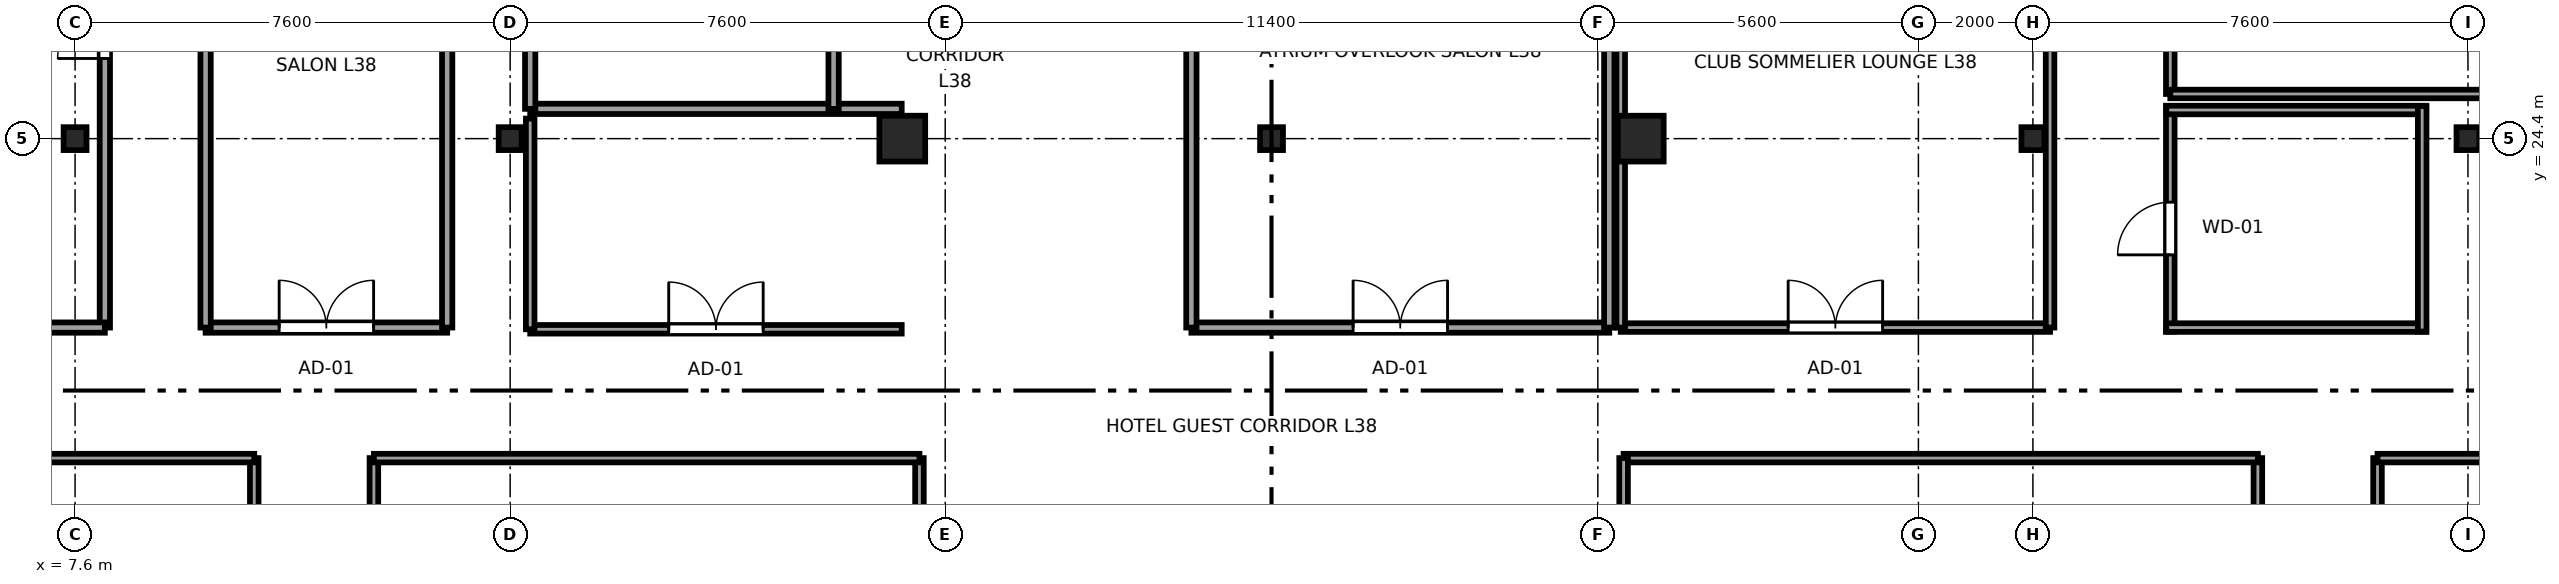
"""IFC4 building model, lengths in metres.
Left out: names, types, materials, properties, quantities, classifications, styles, units other than length and angle.
Written with IfcOpenShell. Run it as: python <this file> out.ifc"""

import sys

from ifc_helpers import new_model, si_unit, direction, frame, frame_2d, origin, origin_2d, place, context, subcontext, project, spatial, rectangle, i_section, extrude, source, transform, mapped, element, fill, save


model = new_model("IFC4")
c1 = context("Model", 3, precision=1e-05, world=origin(), true_north=direction((0.0, 1.0)))
c2 = subcontext(c1, "Body", "Model", "MODEL_VIEW")
j1 = project(units=[si_unit("LENGTHUNIT", "METRE"), si_unit("PLANEANGLEUNIT", "RADIAN")], contexts=[c1])
p1 = place(None, origin())
s1 = spatial("IfcSite", under=j1, at=p1, CompositionType="ELEMENT")
p2 = place(p1, origin())
s2 = spatial("IfcBuilding", under=s1, at=p2, CompositionType="ELEMENT")
p3 = place(p2, frame((0.0, 0.0, 147.05)))
s3 = spatial("IfcBuildingStorey", under=s2, at=p3, CompositionType="ELEMENT", Elevation=147.05)
m1 = source(origin(), c2, "Body", "SweptSolid", [
    extrude(i_section(OverallWidth=0.4, OverallDepth=0.4, WebThickness=0.02, FlangeThickness=0.035, at=origin_2d()), origin(), (0.0, 0.0, 1.0), 3.55),
])
for number, where, z_axis, x_axis in (
    (1, (7.6, 24.4, 0.0), (0.0, 0.0, 1.0), (1.0, 0.0, 0.0)),
    (2, (15.2, 24.4, 0.0), (0.0, 0.0, 1.0), (1.0, 0.0, 0.0)),
):
    element("IfcColumn", number, at=place(p3, frame(where, z_axis=z_axis, x_axis=x_axis)), inside=s3, PredefinedType="COLUMN", context=c2, shape_type="MappedRepresentation", body=[
        mapped(m1, transform((0.0, 0.0, 0.0), x_axis=(1.0, 0.0, 0.0), y_axis=(0.0, 1.0, 0.0), z_axis=(0.0, 0.0, 1.0), scale=1.0)),
    ])
m2 = source(origin(), c2, "Body", "SweptSolid", [
    extrude(rectangle(XDim=0.8, YDim=0.8, at=origin_2d()), origin(), (0.0, 0.0, 1.0), 3.55),
])
for number, where, z_axis, x_axis in (
    (3, (22.05, 24.4, 0.0), (0.0, 0.0, 1.0), (1.0, 0.0, 0.0)),
    (4, (34.95, 24.4, 0.0), (0.0, 0.0, 1.0), (1.0, 0.0, 0.0)),
):
    element("IfcColumn", number, at=place(p3, frame(where, z_axis=z_axis, x_axis=x_axis)), inside=s3, PredefinedType="COLUMN", context=c2, shape_type="MappedRepresentation", body=[
        mapped(m2, transform((0.0, 0.0, 0.0), x_axis=(1.0, 0.0, 0.0), y_axis=(0.0, 1.0, 0.0), z_axis=(0.0, 0.0, 1.0), scale=1.0)),
    ])
for number, where, z_axis, x_axis in (
    (5, (41.8, 24.4, 0.0), (0.0, 0.0, 1.0), (1.0, 0.0, 0.0)),
    (6, (49.4, 24.4, 0.0), (0.0, 0.0, 1.0), (1.0, 0.0, 0.0)),
    (7, (28.5, 24.4, 0.0), (0.0, 0.0, 1.0), (1.0, 0.0, 0.0)),
):
    element("IfcColumn", number, at=place(p3, frame(where, z_axis=z_axis, x_axis=x_axis)), inside=s3, PredefinedType="COLUMN", context=c2, shape_type="MappedRepresentation", body=[
        mapped(m1, transform((0.0, 0.0, 0.0), x_axis=(1.0, 0.0, 0.0), y_axis=(0.0, 1.0, 0.0), z_axis=(0.0, 0.0, 1.0), scale=1.0)),
    ])
p4 = place(p3, frame((10.73, 13.41, 0.0), z_axis=(0.0, 0.0, 1.0), x_axis=(0.0, 1.0, 0.0)))
e8 = element("IfcWall", 8, at=p4, inside=s3, PredefinedType="PARTITIONING", context=c2, shape_type="SweptSolid", body=[
    extrude(rectangle(XDim=5.41, YDim=0.15, at=frame_2d((2.705, 0.0))), origin(), (0.0, 0.0, 1.0), 3.37),
])
p5 = place(p4, frame((2.195, 0.0, 0.0)))
e9 = element("IfcOpeningElement", 9, at=p5, cuts=e8, PredefinedType="OPENING", context=c2, shape_type="SweptSolid", body=[
    extrude(rectangle(XDim=0.98, YDim=2.12, at=frame_2d((0.49, 1.06))), frame((0.0, 0.085, 0.0), z_axis=(0.0, -1.0, 0.0), x_axis=(1.0, 0.0, 0.0)), (0.0, 0.0, 1.0), 0.17),
])
p6 = place(p3, frame((3.005, 18.82, 0.0), z_axis=(0.0, 0.0, 1.0), x_axis=(1.0, 0.0, 0.0)))
e10 = element("IfcWall", 10, at=p6, inside=s3, PredefinedType="PARTITIONING", context=c2, shape_type="SweptSolid", body=[
    extrude(rectangle(XDim=7.725, YDim=0.15, at=frame_2d((3.863, 0.0))), origin(), (0.0, 0.0, 1.0), 3.37),
])
p7 = place(p3, frame((12.82, 15.713, 0.0), z_axis=(0.0, 0.0, 1.0), x_axis=(0.0, 1.0, 0.0)))
e11 = element("IfcWall", 11, at=p7, inside=s3, PredefinedType="PARTITIONING", context=c2, shape_type="SweptSolid", body=[
    extrude(rectangle(XDim=3.107, YDim=0.15, at=frame_2d((1.554, 0.0))), origin(), (0.0, 0.0, 1.0), 3.37),
])
p8 = place(p7, frame((1.043, 0.0, 0.0)))
e12 = element("IfcOpeningElement", 12, at=p8, cuts=e11, PredefinedType="OPENING", context=c2, shape_type="SweptSolid", body=[
    extrude(rectangle(XDim=0.98, YDim=2.12, at=frame_2d((0.49, 1.06))), frame((0.0, 0.085, 0.0), z_axis=(0.0, -1.0, 0.0), x_axis=(1.0, 0.0, 0.0)), (0.0, 0.0, 1.0), 0.17),
])
p9 = place(p3, frame((22.35, 13.68, 0.0), z_axis=(0.0, 0.0, 1.0), x_axis=(0.0, 1.0, 0.0)))
e13 = element("IfcWall", 13, at=p9, inside=s3, PredefinedType="PARTITIONING", context=c2, shape_type="SweptSolid", body=[
    extrude(rectangle(XDim=5.14, YDim=0.15, at=frame_2d((2.57, 0.0))), origin(), (0.0, 0.0, 1.0), 2.16),
])
p10 = place(p3, frame((12.82, 18.82, 0.0), z_axis=(0.0, 0.0, 1.0), x_axis=(1.0, 0.0, 0.0)))
e14 = element("IfcWall", 14, at=p10, inside=s3, PredefinedType="PARTITIONING", context=c2, shape_type="SweptSolid", body=[
    extrude(rectangle(XDim=9.53, YDim=0.15, at=frame_2d((4.765, 0.0))), origin(), (0.0, 0.0, 1.0), 3.37),
])
p11 = place(p3, frame((45.73, 13.41, 0.0), z_axis=(0.0, 0.0, 1.0), x_axis=(0.0, 1.0, 0.0)))
e15 = element("IfcWall", 15, at=p11, inside=s3, PredefinedType="PARTITIONING", context=c2, shape_type="SweptSolid", body=[
    extrude(rectangle(XDim=5.41, YDim=0.15, at=frame_2d((2.705, 0.0))), origin(), (0.0, 0.0, 1.0), 3.001),
])
p12 = place(p11, frame((2.195, 0.0, 0.0)))
e16 = element("IfcOpeningElement", 16, at=p12, cuts=e15, PredefinedType="OPENING", context=c2, shape_type="SweptSolid", body=[
    extrude(rectangle(XDim=0.98, YDim=2.12, at=frame_2d((0.49, 1.06))), frame((0.0, 0.085, 0.0), z_axis=(0.0, -1.0, 0.0), x_axis=(1.0, 0.0, 0.0)), (0.0, 0.0, 1.0), 0.17),
])
p13 = place(p3, frame((34.65, 18.82, 0.0), z_axis=(0.0, 0.0, 1.0), x_axis=(1.0, 0.0, 0.0)))
e17 = element("IfcWall", 17, at=p13, inside=s3, PredefinedType="PARTITIONING", context=c2, shape_type="SweptSolid", body=[
    extrude(rectangle(XDim=11.08, YDim=0.15, at=frame_2d((5.54, 0.0))), origin(), (0.0, 0.0, 1.0), 3.37),
])
p14 = place(p3, frame((34.65, 11.08, 0.0), z_axis=(0.0, 0.0, 1.0), x_axis=(0.0, 1.0, 0.0)))
e18 = element("IfcWall", 18, at=p14, inside=s3, PredefinedType="PARTITIONING", context=c2, shape_type="SweptSolid", body=[
    extrude(rectangle(XDim=7.74, YDim=0.15, at=frame_2d((3.87, 0.0))), origin(), (0.0, 0.0, 1.0), 2.16),
])
p15 = place(p3, frame((47.82, 15.713, 0.0), z_axis=(0.0, 0.0, 1.0), x_axis=(0.0, 1.0, 0.0)))
e19 = element("IfcWall", 19, at=p15, inside=s3, PredefinedType="PARTITIONING", context=c2, shape_type="SweptSolid", body=[
    extrude(rectangle(XDim=3.107, YDim=0.15, at=frame_2d((1.554, 0.0))), origin(), (0.0, 0.0, 1.0), 3.37),
])
p16 = place(p15, frame((1.043, 0.0, 0.0)))
e20 = element("IfcOpeningElement", 20, at=p16, cuts=e19, PredefinedType="OPENING", context=c2, shape_type="SweptSolid", body=[
    extrude(rectangle(XDim=0.98, YDim=2.12, at=frame_2d((0.49, 1.06))), frame((0.0, 0.085, 0.0), z_axis=(0.0, -1.0, 0.0), x_axis=(1.0, 0.0, 0.0)), (0.0, 0.0, 1.0), 0.17),
])
p17 = place(p3, frame((47.82, 18.82, 0.0), z_axis=(0.0, 0.0, 1.0), x_axis=(1.0, 0.0, 0.0)))
e21 = element("IfcWall", 21, at=p17, inside=s3, PredefinedType="PARTITIONING", context=c2, shape_type="SweptSolid", body=[
    extrude(rectangle(XDim=6.175, YDim=0.15, at=frame_2d((3.087, 0.0))), origin(), (0.0, 0.0, 1.0), 3.37),
])
p18 = place(p3, frame((8.12, 21.1, 0.0), z_axis=(0.0, 0.0, 1.0), x_axis=(0.0, 1.0, 0.0)))
e22 = element("IfcWall", 22, at=p18, inside=s3, PredefinedType="PARTITIONING", context=c2, shape_type="SweptSolid", body=[
    extrude(rectangle(XDim=14.7, YDim=0.18, at=frame_2d((7.35, 0.0))), origin(), (0.0, 0.0, 1.0), 3.37),
])
p19 = place(p18, frame((4.7, 0.0, 0.0)))
e23 = element("IfcOpeningElement", 23, at=p19, cuts=e22, PredefinedType="OPENING", context=c2, shape_type="SweptSolid", body=[
    extrude(rectangle(XDim=1.65, YDim=2.15, at=frame_2d((0.825, 1.075))), frame((0.0, 0.1, 0.0), z_axis=(0.0, -1.0, 0.0), x_axis=(1.0, 0.0, 0.0)), (0.0, 0.0, 1.0), 0.2),
])
p20 = place(p3, frame((3.005, 21.1, 0.0), z_axis=(0.0, 0.0, 1.0), x_axis=(1.0, 0.0, 0.0)))
e24 = element("IfcWall", 24, at=p20, inside=s3, PredefinedType="PARTITIONING", context=c2, shape_type="SweptSolid", body=[
    extrude(rectangle(XDim=5.115, YDim=0.18, at=frame_2d((2.558, 0.0))), origin(), (0.0, 0.0, 1.0), 3.37),
])
p21 = place(p3, frame((44.2, 21.03, 0.0), z_axis=(0.0, 0.0, 1.0), x_axis=(0.0, 1.0, 0.0)))
e25 = element("IfcWall", 25, at=p21, inside=s3, PredefinedType="PARTITIONING", context=c2, shape_type="SweptSolid", body=[
    extrude(rectangle(XDim=3.94, YDim=0.15, at=frame_2d((1.97, 0.0))), origin(), (0.0, 0.0, 1.0), 3.37),
])
p22 = place(p21, frame((1.34, 0.0, 0.0)))
e26 = element("IfcOpeningElement", 26, at=p22, cuts=e25, PredefinedType="OPENING", context=c2, shape_type="SweptSolid", body=[
    extrude(rectangle(XDim=0.92, YDim=2.01, at=frame_2d((0.46, 1.005))), frame((0.0, 0.085, 0.0), z_axis=(0.0, -1.0, 0.0), x_axis=(1.0, 0.0, 0.0)), (0.0, 0.0, 1.0), 0.17),
])
for number, where, z_axis, x_axis in (
    (27, (44.13, 21.1, 0.0), (0.0, 0.0, 1.0), (1.0, 0.0, 0.0)),
    (28, (44.13, 24.9, 0.0), (0.0, 0.0, 1.0), (1.0, 0.0, 0.0)),
):
    element("IfcWall", number, at=place(p3, frame(where, z_axis=z_axis, x_axis=x_axis)), inside=s3, PredefinedType="PARTITIONING", context=c2, shape_type="SweptSolid", body=[
        extrude(rectangle(XDim=4.54, YDim=0.15, at=frame_2d((2.27, 0.0))), origin(), (0.0, 0.0, 1.0), 3.37),
    ])
p23 = place(p3, frame((48.6, 21.03, 0.0), z_axis=(0.0, 0.0, 1.0), x_axis=(0.0, 1.0, 0.0)))
e29 = element("IfcWall", 29, at=p23, inside=s3, PredefinedType="PARTITIONING", context=c2, shape_type="SweptSolid", body=[
    extrude(rectangle(XDim=3.94, YDim=0.15, at=frame_2d((1.97, 0.0))), origin(), (0.0, 0.0, 1.0), 3.37),
])
p24 = place(p3, frame((44.2, 25.18, 0.0), z_axis=(0.0, 0.0, 1.0), x_axis=(0.0, 1.0, 0.0)))
e30 = element("IfcWall", 30, at=p24, inside=s3, PredefinedType="PARTITIONING", context=c2, shape_type="SweptSolid", body=[
    extrude(rectangle(XDim=12.34, YDim=0.15, at=frame_2d((6.17, 0.0))), origin(), (0.0, 0.0, 1.0), 3.37),
])
p25 = place(p24, frame((5.68, 0.0, 0.0)))
e31 = element("IfcOpeningElement", 31, at=p25, cuts=e30, PredefinedType="OPENING", context=c2, shape_type="SweptSolid", body=[
    extrude(rectangle(XDim=0.98, YDim=2.12, at=frame_2d((0.49, 1.06))), frame((0.0, 0.085, 0.0), z_axis=(0.0, -1.0, 0.0), x_axis=(1.0, 0.0, 0.0)), (0.0, 0.0, 1.0), 0.17),
])
p26 = place(p3, frame((44.2, 25.18, 0.0), z_axis=(0.0, 0.0, 1.0), x_axis=(1.0, 0.0, 0.0)))
e32 = element("IfcWall", 32, at=p26, inside=s3, PredefinedType="PARTITIONING", context=c2, shape_type="SweptSolid", body=[
    extrude(rectangle(XDim=9.795, YDim=0.15, at=frame_2d((4.897, 0.0))), origin(), (0.0, 0.0, 1.0), 3.37),
])
p27 = place(p3, frame((9.88, 21.1, 0.0), z_axis=(0.0, 0.0, 1.0), x_axis=(1.0, 0.0, 0.0)))
e33 = element("IfcWall", 33, at=p27, inside=s3, PredefinedType="PARTITIONING", context=c2, shape_type="SweptSolid", body=[
    extrude(rectangle(XDim=4.22, YDim=0.18, at=frame_2d((2.11, 0.0))), origin(), (0.0, 0.0, 1.0), 3.37),
])
p28 = place(p27, frame((1.285, 0.0, 0.0)))
e34 = element("IfcOpeningElement", 34, at=p28, cuts=e33, PredefinedType="OPENING", context=c2, shape_type="SweptSolid", body=[
    extrude(rectangle(XDim=1.65, YDim=2.15, at=frame_2d((0.825, 1.075))), frame((0.0, 0.1, 0.0), z_axis=(0.0, -1.0, 0.0), x_axis=(1.0, 0.0, 0.0)), (0.0, 0.0, 1.0), 0.2),
])
for number, where, z_axis, x_axis in (
    (35, (9.88, 21.1, 0.0), (0.0, 0.0, 1.0), (0.0, 1.0, 0.0)),
    (36, (14.1, 21.1, 0.0), (0.0, 0.0, 1.0), (0.0, 1.0, 0.0)),
):
    element("IfcWall", number, at=place(p3, frame(where, z_axis=z_axis, x_axis=x_axis)), inside=s3, PredefinedType="PARTITIONING", context=c2, shape_type="SweptSolid", body=[
        extrude(rectangle(XDim=8.65, YDim=0.18, at=frame_2d((4.325, 0.0))), origin(), (0.0, 0.0, 1.0), 3.37),
    ])
p29 = place(p3, frame((27.1, 21.1, 0.0), z_axis=(0.0, 0.0, 1.0), x_axis=(1.0, 0.0, 0.0)))
e37 = element("IfcWall", 37, at=p29, inside=s3, PredefinedType="PARTITIONING", context=c2, shape_type="SweptSolid", body=[
    extrude(rectangle(XDim=7.3, YDim=0.18, at=frame_2d((3.65, 0.0))), origin(), (0.0, 0.0, 1.0), 3.37),
])
p30 = place(p29, frame((2.825, 0.0, 0.0)))
e38 = element("IfcOpeningElement", 38, at=p30, cuts=e37, PredefinedType="OPENING", context=c2, shape_type="SweptSolid", body=[
    extrude(rectangle(XDim=1.65, YDim=2.15, at=frame_2d((0.825, 1.075))), frame((0.0, 0.1, 0.0), z_axis=(0.0, -1.0, 0.0), x_axis=(1.0, 0.0, 0.0)), (0.0, 0.0, 1.0), 0.2),
])
for number, where, z_axis, x_axis in (
    (39, (27.1, 21.1, 0.0), (0.0, 0.0, 1.0), (0.0, 1.0, 0.0)),
    (40, (34.4, 21.1, 0.0), (0.0, 0.0, 1.0), (0.0, 1.0, 0.0)),
):
    element("IfcWall", number, at=place(p3, frame(where, z_axis=z_axis, x_axis=x_axis)), inside=s3, PredefinedType="PARTITIONING", context=c2, shape_type="SweptSolid", body=[
        extrude(rectangle(XDim=8.7, YDim=0.18, at=frame_2d((4.35, 0.0))), origin(), (0.0, 0.0, 1.0), 3.37),
    ])
p31 = place(p3, frame((15.55, 24.92, 0.0), z_axis=(0.0, 0.0, 1.0), x_axis=(1.0, 0.0, 0.0)))
e41 = element("IfcWall", 41, at=p31, inside=s3, PredefinedType="PARTITIONING", context=c2, shape_type="SweptSolid", body=[
    extrude(rectangle(XDim=6.49, YDim=0.18, at=frame_2d((3.245, 0.0))), origin(), (0.0, 0.0, 1.0), 3.37),
])
for number, where, z_axis, x_axis in (
    (42, (15.55, 24.92, 0.0), (0.0, 0.0, 1.0), (0.0, 1.0, 0.0)),
    (43, (20.85, 24.92, 0.0), (0.0, 0.0, 1.0), (0.0, 1.0, 0.0)),
):
    element("IfcWall", number, at=place(p3, frame(where, z_axis=z_axis, x_axis=x_axis)), inside=s3, PredefinedType="PARTITIONING", context=c2, shape_type="SweptSolid", body=[
        extrude(rectangle(XDim=4.88, YDim=0.18, at=frame_2d((2.44, 0.0))), origin(), (0.0, 0.0, 1.0), 3.37),
    ])
p32 = place(p3, frame((15.55, 21.07, 0.0), z_axis=(0.0, 0.0, 1.0), x_axis=(1.0, 0.0, 0.0)))
e44 = element("IfcWall", 44, at=p32, inside=s3, PredefinedType="PARTITIONING", context=c2, shape_type="SweptSolid", body=[
    extrude(rectangle(XDim=6.49, YDim=0.15, at=frame_2d((3.245, 0.0))), origin(), (0.0, 0.0, 1.0), 3.37),
])
p33 = place(p32, frame((2.42, 0.0, 0.0)))
e45 = element("IfcOpeningElement", 45, at=p33, cuts=e44, PredefinedType="OPENING", context=c2, shape_type="SweptSolid", body=[
    extrude(rectangle(XDim=1.65, YDim=2.15, at=frame_2d((0.825, 1.075))), frame((0.0, 0.085, 0.0), z_axis=(0.0, -1.0, 0.0), x_axis=(1.0, 0.0, 0.0)), (0.0, 0.0, 1.0), 0.17),
])
p34 = place(p3, frame((15.55, 21.07, 0.0), z_axis=(0.0, 0.0, 1.0), x_axis=(0.0, 1.0, 0.0)))
e46 = element("IfcWall", 46, at=p34, inside=s3, PredefinedType="PARTITIONING", context=c2, shape_type="SweptSolid", body=[
    extrude(rectangle(XDim=3.68, YDim=0.15, at=frame_2d((1.84, 0.0))), origin(), (0.0, 0.0, 1.0), 3.37),
])
p35 = place(p3, frame((34.6, 21.1, 0.0), z_axis=(0.0, 0.0, 1.0), x_axis=(1.0, 0.0, 0.0)))
e47 = element("IfcWall", 47, at=p35, inside=s3, PredefinedType="PARTITIONING", context=c2, shape_type="SweptSolid", body=[
    extrude(rectangle(XDim=7.5, YDim=0.15, at=frame_2d((3.75, 0.0))), origin(), (0.0, 0.0, 1.0), 3.37),
])
p36 = place(p35, frame((2.925, 0.0, 0.0)))
e48 = element("IfcOpeningElement", 48, at=p36, cuts=e47, PredefinedType="OPENING", context=c2, shape_type="SweptSolid", body=[
    extrude(rectangle(XDim=1.65, YDim=2.15, at=frame_2d((0.825, 1.075))), frame((0.0, 0.085, 0.0), z_axis=(0.0, -1.0, 0.0), x_axis=(1.0, 0.0, 0.0)), (0.0, 0.0, 1.0), 0.17),
])
p37 = place(p3, frame((34.6, 21.1, 0.0), z_axis=(0.0, 0.0, 1.0), x_axis=(0.0, 1.0, 0.0)))
e49 = element("IfcWall", 49, at=p37, inside=s3, PredefinedType="PARTITIONING", context=c2, shape_type="SweptSolid", body=[
    extrude(rectangle(XDim=8.3, YDim=0.15, at=frame_2d((4.15, 0.0))), origin(), (0.0, 0.0, 1.0), 3.37),
])
p38 = place(p3, frame((42.1, 21.1, 0.0), z_axis=(0.0, 0.0, 1.0), x_axis=(0.0, 1.0, 0.0)))
e50 = element("IfcWall", 50, at=p38, inside=s3, PredefinedType="PARTITIONING", context=c2, shape_type="SweptSolid", body=[
    extrude(rectangle(XDim=8.3, YDim=0.15, at=frame_2d((4.15, 0.0))), origin(), (0.0, 0.0, 1.0), 2.16),
])
m3 = source(origin(), c2, "Body", "SweptSolid", [
    extrude(rectangle(XDim=1.65, YDim=2.15, at=frame_2d((0.825, 1.075))), frame((0.0, 0.025, 0.0), z_axis=(0.0, -1.0, 0.0), x_axis=(1.0, 0.0, 0.0)), (0.0, 0.0, 1.0), 0.05),
])
p39 = place(p19, origin())
e51 = element("IfcDoor", 51, at=p39, inside=s3, OperationType="DOUBLE_DOOR_SINGLE_SWING", PredefinedType="DOOR", context=c2, shape_type="MappedRepresentation", body=[
    mapped(m3, transform((0.0, 0.0, 0.0), x_axis=(1.0, 0.0, 0.0), y_axis=(0.0, 1.0, 0.0), z_axis=(0.0, 0.0, 1.0), scale=1.0)),
])
fill(e23, e51)
m4 = source(origin(), c2, "Body", "SweptSolid", [
    extrude(rectangle(XDim=0.92, YDim=2.01, at=frame_2d((0.46, 1.005))), frame((0.0, 0.025, 0.0), z_axis=(0.0, -1.0, 0.0), x_axis=(1.0, 0.0, 0.0)), (0.0, 0.0, 1.0), 0.05),
])
p40 = place(p22, origin())
e52 = element("IfcDoor", 52, at=p40, inside=s3, OperationType="SINGLE_SWING_LEFT", PredefinedType="DOOR", context=c2, shape_type="MappedRepresentation", body=[
    mapped(m4, transform((0.0, 0.0, 0.0), x_axis=(1.0, 0.0, 0.0), y_axis=(0.0, 1.0, 0.0), z_axis=(0.0, 0.0, 1.0), scale=1.0)),
])
fill(e26, e52)
p41 = place(p28, origin())
e53 = element("IfcDoor", 53, at=p41, inside=s3, OperationType="DOUBLE_DOOR_SINGLE_SWING", PredefinedType="DOOR", context=c2, shape_type="MappedRepresentation", body=[
    mapped(m3, transform((0.0, 0.0, 0.0), x_axis=(1.0, 0.0, 0.0), y_axis=(0.0, 1.0, 0.0), z_axis=(0.0, 0.0, 1.0), scale=1.0)),
])
fill(e34, e53)
p42 = place(p30, origin())
e54 = element("IfcDoor", 54, at=p42, inside=s3, OperationType="DOUBLE_DOOR_SINGLE_SWING", PredefinedType="DOOR", context=c2, shape_type="MappedRepresentation", body=[
    mapped(m3, transform((0.0, 0.0, 0.0), x_axis=(1.0, 0.0, 0.0), y_axis=(0.0, 1.0, 0.0), z_axis=(0.0, 0.0, 1.0), scale=1.0)),
])
fill(e38, e54)
p43 = place(p33, origin())
e55 = element("IfcDoor", 55, at=p43, inside=s3, OperationType="DOUBLE_DOOR_SINGLE_SWING", PredefinedType="DOOR", context=c2, shape_type="MappedRepresentation", body=[
    mapped(m3, transform((0.0, 0.0, 0.0), x_axis=(1.0, 0.0, 0.0), y_axis=(0.0, 1.0, 0.0), z_axis=(0.0, 0.0, 1.0), scale=1.0)),
])
fill(e45, e55)
p44 = place(p36, origin())
e56 = element("IfcDoor", 56, at=p44, inside=s3, OperationType="DOUBLE_DOOR_SINGLE_SWING", PredefinedType="DOOR", context=c2, shape_type="MappedRepresentation", body=[
    mapped(m3, transform((0.0, 0.0, 0.0), x_axis=(1.0, 0.0, 0.0), y_axis=(0.0, 1.0, 0.0), z_axis=(0.0, 0.0, 1.0), scale=1.0)),
])
fill(e48, e56)
save(model, sys.argv[1])
